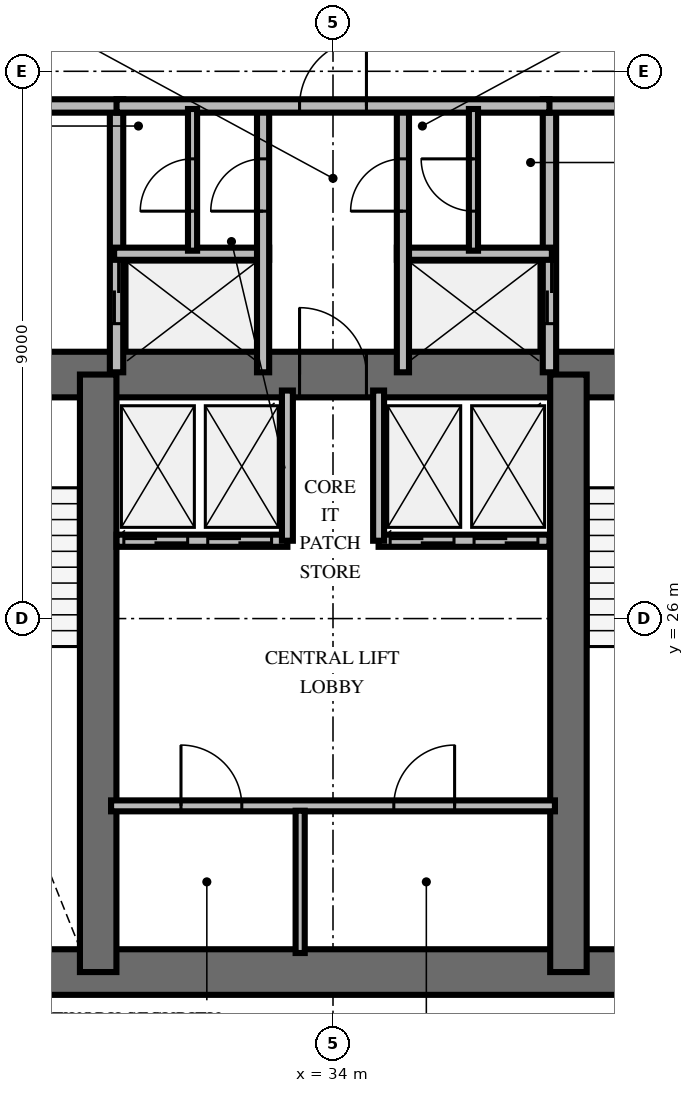
"""IFC4 building model, lengths in metres.
Left out: names, types, materials, properties, quantities, classifications, styles, units other than length and angle.
Written with IfcOpenShell. Run it as: python <this file> out.ifc"""

import sys

from ifc_helpers import new_model, si_unit, direction, frame, frame_2d, origin, place, context, subcontext, project, spatial, rectangle, extrude, element, fill, save


model = new_model("IFC4")
c1 = context("Model", 3, precision=1e-05, world=origin(), true_north=direction((0.0, 1.0)))
c2 = subcontext(c1, "Body", "Model", "MODEL_VIEW")
j1 = project(units=[si_unit("LENGTHUNIT", "METRE"), si_unit("PLANEANGLEUNIT", "RADIAN")], contexts=[c1])
p1 = place(None, origin())
s1 = spatial("IfcSite", under=j1, at=p1, CompositionType="ELEMENT")
p2 = place(p1, origin())
s2 = spatial("IfcBuilding", under=s1, at=p2, CompositionType="ELEMENT")
p3 = place(p2, frame((0.0, 0.0, 198.8)))
s3 = spatial("IfcBuildingStorey", under=s2, at=p3, CompositionType="ELEMENT", Elevation=198.8)
p4 = place(p3, frame((26.072, 20.187, 0.0), z_axis=(0.0, 0.0, 1.0), x_axis=(1.0, 0.0, 0.0)))
e1 = element("IfcWall", 1, at=p4, inside=s3, PredefinedType="SHEAR", context=c2, shape_type="SweptSolid", body=[
    extrude(rectangle(XDim=15.866, YDim=0.75, at=frame_2d((7.933, 0.0))), origin(), (0.0, 0.0, 1.0), 3.6),
])
p5 = place(p3, frame((26.072, 30.013, 0.0), z_axis=(0.0, 0.0, 1.0), x_axis=(1.0, 0.0, 0.0)))
e2 = element("IfcWall", 2, at=p5, inside=s3, PredefinedType="SHEAR", context=c2, shape_type="SweptSolid", body=[
    extrude(rectangle(XDim=15.866, YDim=0.75, at=frame_2d((7.933, 0.0))), origin(), (0.0, 0.0, 1.0), 3.6),
])
p6 = place(p5, frame((0.878, 0.0, 0.0)))
e3 = element("IfcOpeningElement", 3, at=p6, cuts=e2, PredefinedType="OPENING", context=c2, shape_type="SweptSolid", body=[
    extrude(rectangle(XDim=1.05, YDim=2.15, at=frame_2d((0.525, 1.075))), frame((0.0, 0.385, 0.0), z_axis=(0.0, -1.0, 0.0), x_axis=(1.0, 0.0, 0.0)), (0.0, 0.0, 1.0), 0.77),
])
p7 = place(p5, frame((13.928, 0.0, 0.0)))
e4 = element("IfcOpeningElement", 4, at=p7, cuts=e2, PredefinedType="OPENING", context=c2, shape_type="SweptSolid", body=[
    extrude(rectangle(XDim=1.05, YDim=2.15, at=frame_2d((0.525, 1.075))), frame((0.0, 0.385, 0.0), z_axis=(0.0, -1.0, 0.0), x_axis=(1.0, 0.0, 0.0)), (0.0, 0.0, 1.0), 0.77),
])
p8 = place(p5, frame((7.378, 0.0, 0.0)))
e5 = element("IfcOpeningElement", 5, at=p8, cuts=e2, PredefinedType="OPENING", context=c2, shape_type="SweptSolid", body=[
    extrude(rectangle(XDim=1.1, YDim=2.15, at=frame_2d((0.55, 1.075))), frame((0.0, 0.385, 0.0), z_axis=(0.0, -1.0, 0.0), x_axis=(1.0, 0.0, 0.0)), (0.0, 0.0, 1.0), 0.77),
])
for number, where, z_axis, x_axis in (
    (6, (30.138, 20.187, 0.0), (0.0, 0.0, 1.0), (0.0, 1.0, 0.0)),
    (7, (37.872, 20.187, 0.0), (0.0, 0.0, 1.0), (0.0, 1.0, 0.0)),
):
    element("IfcWall", number, at=place(p3, frame(where, z_axis=z_axis, x_axis=x_axis)), inside=s3, PredefinedType="SHEAR", context=c2, shape_type="SweptSolid", body=[
        extrude(rectangle(XDim=9.826, YDim=0.6, at=frame_2d((4.913, 0.0))), origin(), (0.0, 0.0, 1.0), 3.6),
    ])
p9 = place(p3, frame((30.44, 30.05, 0.0), z_axis=(0.0, 0.0, 1.0), x_axis=(0.0, 1.0, 0.0)))
e8 = element("IfcWall", 8, at=p9, inside=s3, PredefinedType="SOLIDWALL", context=c2, shape_type="SweptSolid", body=[
    extrude(rectangle(XDim=4.38, YDim=0.22, at=frame_2d((2.19, 0.0))), origin(), (0.0, 0.0, 1.0), 2.46),
])
p10 = place(p9, frame((0.8, 0.0, 0.0)))
e9 = element("IfcOpeningElement", 9, at=p10, cuts=e8, PredefinedType="OPENING", context=c2, shape_type="SweptSolid", body=[
    extrude(rectangle(XDim=1.05, YDim=2.1, at=frame_2d((0.525, 1.05))), frame((0.0, 0.12, 0.0), z_axis=(0.0, -1.0, 0.0), x_axis=(1.0, 0.0, 0.0)), (0.0, 0.0, 1.0), 0.24),
])
p11 = place(p3, frame((26.24, 34.43, 0.0), z_axis=(0.0, 0.0, 1.0), x_axis=(1.0, 0.0, 0.0)))
e10 = element("IfcWall", 10, at=p11, inside=s3, PredefinedType="SOLIDWALL", context=c2, shape_type="SweptSolid", body=[
    extrude(rectangle(XDim=4.31, YDim=0.22, at=frame_2d((2.155, 0.0))), origin(), (0.0, 0.0, 1.0), 2.46),
])
p12 = place(p11, frame((1.6, 0.0, 0.0)))
e11 = element("IfcOpeningElement", 11, at=p12, cuts=e10, PredefinedType="OPENING", context=c2, shape_type="SweptSolid", body=[
    extrude(rectangle(XDim=1.1, YDim=2.15, at=frame_2d((0.55, 1.075))), frame((0.0, 0.12, 0.0), z_axis=(0.0, -1.0, 0.0), x_axis=(1.0, 0.0, 0.0)), (0.0, 0.0, 1.0), 0.24),
])
p13 = place(p3, frame((30.4, 32.0, 0.0), z_axis=(0.0, 0.0, 1.0), x_axis=(1.0, 0.0, 0.0)))
e12 = element("IfcWall", 12, at=p13, inside=s3, PredefinedType="SOLIDWALL", context=c2, shape_type="SweptSolid", body=[
    extrude(rectangle(XDim=2.55, YDim=0.2, at=frame_2d((1.275, 0.0))), origin(), (0.0, 0.0, 1.0), 2.46),
])
p14 = place(p3, frame((32.85, 30.05, 0.0), z_axis=(0.0, 0.0, 1.0), x_axis=(0.0, 1.0, 0.0)))
e13 = element("IfcWall", 13, at=p14, inside=s3, PredefinedType="SOLIDWALL", context=c2, shape_type="SweptSolid", body=[
    extrude(rectangle(XDim=4.38, YDim=0.2, at=frame_2d((2.19, 0.0))), origin(), (0.0, 0.0, 1.0), 2.46),
])
p15 = place(p14, frame((2.65, 0.0, 0.0)))
e14 = element("IfcOpeningElement", 14, at=p15, cuts=e13, PredefinedType="OPENING", context=c2, shape_type="SweptSolid", body=[
    extrude(rectangle(XDim=0.86, YDim=2.05, at=frame_2d((0.43, 1.025))), frame((0.0, 0.11, 0.0), z_axis=(0.0, -1.0, 0.0), x_axis=(1.0, 0.0, 0.0)), (0.0, 0.0, 1.0), 0.22),
])
p16 = place(p3, frame((37.56, 30.05, 0.0), z_axis=(0.0, 0.0, 1.0), x_axis=(0.0, 1.0, 0.0)))
e15 = element("IfcWall", 15, at=p16, inside=s3, PredefinedType="SOLIDWALL", context=c2, shape_type="SweptSolid", body=[
    extrude(rectangle(XDim=4.38, YDim=0.22, at=frame_2d((2.19, 0.0))), origin(), (0.0, 0.0, 1.0), 2.46),
])
p17 = place(p16, frame((0.8, 0.0, 0.0)))
e16 = element("IfcOpeningElement", 16, at=p17, cuts=e15, PredefinedType="OPENING", context=c2, shape_type="SweptSolid", body=[
    extrude(rectangle(XDim=1.05, YDim=2.1, at=frame_2d((0.525, 1.05))), frame((0.0, 0.12, 0.0), z_axis=(0.0, -1.0, 0.0), x_axis=(1.0, 0.0, 0.0)), (0.0, 0.0, 1.0), 0.24),
])
p18 = place(p3, frame((37.45, 34.43, 0.0), z_axis=(0.0, 0.0, 1.0), x_axis=(1.0, 0.0, 0.0)))
e17 = element("IfcWall", 17, at=p18, inside=s3, PredefinedType="SOLIDWALL", context=c2, shape_type="SweptSolid", body=[
    extrude(rectangle(XDim=4.31, YDim=0.22, at=frame_2d((2.155, 0.0))), origin(), (0.0, 0.0, 1.0), 2.46),
])
p19 = place(p18, frame((1.6, 0.0, 0.0)))
e18 = element("IfcOpeningElement", 18, at=p19, cuts=e17, PredefinedType="OPENING", context=c2, shape_type="SweptSolid", body=[
    extrude(rectangle(XDim=1.1, YDim=2.15, at=frame_2d((0.55, 1.075))), frame((0.0, 0.12, 0.0), z_axis=(0.0, -1.0, 0.0), x_axis=(1.0, 0.0, 0.0)), (0.0, 0.0, 1.0), 0.24),
])
p20 = place(p3, frame((35.05, 32.0, 0.0), z_axis=(0.0, 0.0, 1.0), x_axis=(1.0, 0.0, 0.0)))
e19 = element("IfcWall", 19, at=p20, inside=s3, PredefinedType="SOLIDWALL", context=c2, shape_type="SweptSolid", body=[
    extrude(rectangle(XDim=2.55, YDim=0.2, at=frame_2d((1.275, 0.0))), origin(), (0.0, 0.0, 1.0), 2.46),
])
p21 = place(p3, frame((35.15, 30.05, 0.0), z_axis=(0.0, 0.0, 1.0), x_axis=(0.0, 1.0, 0.0)))
e20 = element("IfcWall", 20, at=p21, inside=s3, PredefinedType="SOLIDWALL", context=c2, shape_type="SweptSolid", body=[
    extrude(rectangle(XDim=4.38, YDim=0.2, at=frame_2d((2.19, 0.0))), origin(), (0.0, 0.0, 1.0), 2.46),
])
p22 = place(p21, frame((2.65, 0.0, 0.0)))
e21 = element("IfcOpeningElement", 21, at=p22, cuts=e20, PredefinedType="OPENING", context=c2, shape_type="SweptSolid", body=[
    extrude(rectangle(XDim=0.86, YDim=2.05, at=frame_2d((0.43, 1.025))), frame((0.0, 0.11, 0.0), z_axis=(0.0, -1.0, 0.0), x_axis=(1.0, 0.0, 0.0)), (0.0, 0.0, 1.0), 0.22),
])
p23 = place(p3, frame((30.44, 34.43, 0.0), z_axis=(0.0, 0.0, 1.0), x_axis=(1.0, 0.0, 0.0)))
e22 = element("IfcWall", 22, at=p23, inside=s3, PredefinedType="SOLIDWALL", context=c2, shape_type="SweptSolid", body=[
    extrude(rectangle(XDim=7.12, YDim=0.22, at=frame_2d((3.56, 0.0))), origin(), (0.0, 0.0, 1.0), 2.46),
])
p24 = place(p23, frame((3.01, 0.0, 0.0)))
e23 = element("IfcOpeningElement", 23, at=p24, cuts=e22, PredefinedType="OPENING", context=c2, shape_type="SweptSolid", body=[
    extrude(rectangle(XDim=1.1, YDim=2.15, at=frame_2d((0.55, 1.075))), frame((0.0, 0.12, 0.0), z_axis=(0.0, -1.0, 0.0), x_axis=(1.0, 0.0, 0.0)), (0.0, 0.0, 1.0), 0.24),
])
p25 = place(p3, frame((31.69, 32.05, 0.0), z_axis=(0.0, 0.0, 1.0), x_axis=(0.0, 1.0, 0.0)))
e24 = element("IfcWall", 24, at=p25, inside=s3, PredefinedType="PARTITIONING", context=c2, shape_type="SweptSolid", body=[
    extrude(rectangle(XDim=2.33, YDim=0.15, at=frame_2d((1.165, 0.0))), origin(), (0.0, 0.0, 1.0), 2.46),
])
p26 = place(p25, frame((0.65, 0.0, 0.0)))
e25 = element("IfcOpeningElement", 25, at=p26, cuts=e24, PredefinedType="OPENING", context=c2, shape_type="SweptSolid", body=[
    extrude(rectangle(XDim=0.86, YDim=2.05, at=frame_2d((0.43, 1.025))), frame((0.0, 0.085, 0.0), z_axis=(0.0, -1.0, 0.0), x_axis=(1.0, 0.0, 0.0)), (0.0, 0.0, 1.0), 0.17),
])
p27 = place(p3, frame((36.31, 32.05, 0.0), z_axis=(0.0, 0.0, 1.0), x_axis=(0.0, 1.0, 0.0)))
e26 = element("IfcWall", 26, at=p27, inside=s3, PredefinedType="PARTITIONING", context=c2, shape_type="SweptSolid", body=[
    extrude(rectangle(XDim=2.33, YDim=0.15, at=frame_2d((1.165, 0.0))), origin(), (0.0, 0.0, 1.0), 2.46),
])
p28 = place(p27, frame((0.65, 0.0, 0.0)))
e27 = element("IfcOpeningElement", 27, at=p28, cuts=e26, PredefinedType="OPENING", context=c2, shape_type="SweptSolid", body=[
    extrude(rectangle(XDim=0.86, YDim=2.05, at=frame_2d((0.43, 1.025))), frame((0.0, 0.085, 0.0), z_axis=(0.0, -1.0, 0.0), x_axis=(1.0, 0.0, 0.0)), (0.0, 0.0, 1.0), 0.17),
])
p29 = place(p3, frame((30.35, 22.92, 0.0), z_axis=(0.0, 0.0, 1.0), x_axis=(1.0, 0.0, 0.0)))
e28 = element("IfcWall", 28, at=p29, inside=s3, PredefinedType="PARTITIONING", context=c2, shape_type="SweptSolid", body=[
    extrude(rectangle(XDim=7.3, YDim=0.18, at=frame_2d((3.65, 0.0))), origin(), (0.0, 0.0, 1.0), 2.46),
])
p30 = place(p29, frame((1.15, 0.0, 0.0)))
e29 = element("IfcOpeningElement", 29, at=p30, cuts=e28, PredefinedType="OPENING", context=c2, shape_type="SweptSolid", body=[
    extrude(rectangle(XDim=1.0, YDim=2.15, at=frame_2d((0.5, 1.075))), frame((0.0, 0.1, 0.0), z_axis=(0.0, -1.0, 0.0), x_axis=(1.0, 0.0, 0.0)), (0.0, 0.0, 1.0), 0.2),
])
p31 = place(p29, frame((4.65, 0.0, 0.0)))
e30 = element("IfcOpeningElement", 30, at=p31, cuts=e28, PredefinedType="OPENING", context=c2, shape_type="SweptSolid", body=[
    extrude(rectangle(XDim=1.0, YDim=2.15, at=frame_2d((0.5, 1.075))), frame((0.0, 0.1, 0.0), z_axis=(0.0, -1.0, 0.0), x_axis=(1.0, 0.0, 0.0)), (0.0, 0.0, 1.0), 0.2),
])
p32 = place(p3, frame((33.46, 20.5, 0.0), z_axis=(0.0, 0.0, 1.0), x_axis=(0.0, 1.0, 0.0)))
e31 = element("IfcWall", 31, at=p32, inside=s3, PredefinedType="PARTITIONING", context=c2, shape_type="SweptSolid", body=[
    extrude(rectangle(XDim=2.34, YDim=0.15, at=frame_2d((1.17, 0.0))), origin(), (0.0, 0.0, 1.0), 2.46),
])
p33 = place(p3, frame((30.44, 27.28, 0.0), z_axis=(0.0, 0.0, 1.0), x_axis=(1.0, 0.0, 0.0)))
e32 = element("IfcWall", 32, at=p33, inside=s3, PredefinedType="SOLIDWALL", context=c2, shape_type="SweptSolid", body=[
    extrude(rectangle(XDim=2.81, YDim=0.2, at=frame_2d((1.405, 0.0))), origin(), (0.0, 0.0, 1.0), 2.46),
])
p34 = place(p33, frame((0.12, 0.0, 0.0)))
e33 = element("IfcOpeningElement", 33, at=p34, cuts=e32, PredefinedType="OPENING", context=c2, shape_type="SweptSolid", body=[
    extrude(rectangle(XDim=1.05, YDim=2.1, at=frame_2d((0.525, 1.05))), frame((0.0, 0.11, 0.0), z_axis=(0.0, -1.0, 0.0), x_axis=(1.0, 0.0, 0.0)), (0.0, 0.0, 1.0), 0.22),
])
p35 = place(p33, frame((1.5, 0.0, 0.0)))
e34 = element("IfcOpeningElement", 34, at=p35, cuts=e32, PredefinedType="OPENING", context=c2, shape_type="SweptSolid", body=[
    extrude(rectangle(XDim=1.05, YDim=2.1, at=frame_2d((0.525, 1.05))), frame((0.0, 0.11, 0.0), z_axis=(0.0, -1.0, 0.0), x_axis=(1.0, 0.0, 0.0)), (0.0, 0.0, 1.0), 0.22),
])
p36 = place(p3, frame((33.25, 27.28, 0.0), z_axis=(0.0, 0.0, 1.0), x_axis=(0.0, 1.0, 0.0)))
e35 = element("IfcWall", 35, at=p36, inside=s3, PredefinedType="SOLIDWALL", context=c2, shape_type="SweptSolid", body=[
    extrude(rectangle(XDim=2.47, YDim=0.18, at=frame_2d((1.235, 0.0))), origin(), (0.0, 0.0, 1.0), 2.46),
])
p37 = place(p3, frame((34.75, 27.28, 0.0), z_axis=(0.0, 0.0, 1.0), x_axis=(1.0, 0.0, 0.0)))
e36 = element("IfcWall", 36, at=p37, inside=s3, PredefinedType="SOLIDWALL", context=c2, shape_type="SweptSolid", body=[
    extrude(rectangle(XDim=2.81, YDim=0.2, at=frame_2d((1.405, 0.0))), origin(), (0.0, 0.0, 1.0), 2.46),
])
p38 = place(p37, frame((0.19, 0.0, 0.0)))
e37 = element("IfcOpeningElement", 37, at=p38, cuts=e36, PredefinedType="OPENING", context=c2, shape_type="SweptSolid", body=[
    extrude(rectangle(XDim=1.05, YDim=2.1, at=frame_2d((0.525, 1.05))), frame((0.0, 0.11, 0.0), z_axis=(0.0, -1.0, 0.0), x_axis=(1.0, 0.0, 0.0)), (0.0, 0.0, 1.0), 0.22),
])
p39 = place(p37, frame((1.57, 0.0, 0.0)))
e38 = element("IfcOpeningElement", 38, at=p39, cuts=e36, PredefinedType="OPENING", context=c2, shape_type="SweptSolid", body=[
    extrude(rectangle(XDim=1.05, YDim=2.1, at=frame_2d((0.525, 1.05))), frame((0.0, 0.11, 0.0), z_axis=(0.0, -1.0, 0.0), x_axis=(1.0, 0.0, 0.0)), (0.0, 0.0, 1.0), 0.22),
])
p40 = place(p3, frame((34.75, 27.28, 0.0), z_axis=(0.0, 0.0, 1.0), x_axis=(0.0, 1.0, 0.0)))
e39 = element("IfcWall", 39, at=p40, inside=s3, PredefinedType="SOLIDWALL", context=c2, shape_type="SweptSolid", body=[
    extrude(rectangle(XDim=2.47, YDim=0.18, at=frame_2d((1.235, 0.0))), origin(), (0.0, 0.0, 1.0), 2.46),
])
p41 = place(p3, frame((27.5, 35.28, 0.0), z_axis=(0.0, 0.0, 1.0), x_axis=(0.953691418528, 0.300786765376, 0.0)))
e40 = element("IfcWall", 40, at=p41, inside=s3, PredefinedType="PARTITIONING", context=c2, shape_type="SweptSolid", body=[
    extrude(rectangle(XDim=6.816, YDim=0.18, at=frame_2d((3.408, 0.0))), origin(), (0.0, 0.0, 1.0), 2.46),
])
p42 = place(p41, frame((2.858, 0.0, 0.0)))
e41 = element("IfcOpeningElement", 41, at=p42, cuts=e40, PredefinedType="OPENING", context=c2, shape_type="SweptSolid", body=[
    extrude(rectangle(XDim=1.1, YDim=2.15, at=frame_2d((0.55, 1.075))), frame((0.0, 0.1, 0.0), z_axis=(0.0, -1.0, 0.0), x_axis=(1.0, 0.0, 0.0)), (0.0, 0.0, 1.0), 0.2),
])
p43 = place(p3, frame((34.0, 37.33, 0.0), z_axis=(0.0, 0.0, 1.0), x_axis=(0.953691418528, -0.300786765376, 0.0)))
e42 = element("IfcWall", 42, at=p43, inside=s3, PredefinedType="PARTITIONING", context=c2, shape_type="SweptSolid", body=[
    extrude(rectangle(XDim=6.816, YDim=0.18, at=frame_2d((3.408, 0.0))), origin(), (0.0, 0.0, 1.0), 2.46),
])
p44 = place(p43, frame((2.858, 0.0, 0.0)))
e43 = element("IfcOpeningElement", 43, at=p44, cuts=e42, PredefinedType="OPENING", context=c2, shape_type="SweptSolid", body=[
    extrude(rectangle(XDim=1.1, YDim=2.15, at=frame_2d((0.55, 1.075))), frame((0.0, 0.1, 0.0), z_axis=(0.0, -1.0, 0.0), x_axis=(1.0, 0.0, 0.0)), (0.0, 0.0, 1.0), 0.2),
])
p45 = place(p8, origin())
e44 = element("IfcDoor", 44, at=p45, inside=s3, OperationType="SINGLE_SWING_LEFT", PredefinedType="DOOR", context=c2, shape_type="SweptSolid", body=[
    extrude(rectangle(XDim=1.1, YDim=2.15, at=frame_2d((0.55, 1.075))), frame((0.0, 0.025, 0.0), z_axis=(0.0, -1.0, 0.0), x_axis=(1.0, 0.0, 0.0)), (0.0, 0.0, 1.0), 0.05),
])
fill(e5, e44)
p46 = place(p10, origin())
e45 = element("IfcDoor", 45, at=p46, inside=s3, OperationType="DOUBLE_DOOR_SLIDING", PredefinedType="USERDEFINED", context=c2, shape_type="SweptSolid", body=[
    extrude(rectangle(XDim=1.05, YDim=2.1, at=frame_2d((0.525, 1.05))), frame((0.0, 0.025, 0.0), z_axis=(0.0, -1.0, 0.0), x_axis=(1.0, 0.0, 0.0)), (0.0, 0.0, 1.0), 0.05),
])
fill(e9, e45)
p47 = place(p15, origin())
e46 = element("IfcDoor", 46, at=p47, inside=s3, OperationType="SINGLE_SWING_LEFT", PredefinedType="TRAPDOOR", context=c2, shape_type="SweptSolid", body=[
    extrude(rectangle(XDim=0.86, YDim=2.05, at=frame_2d((0.43, 1.025))), frame((0.0, 0.025, 0.0), z_axis=(0.0, -1.0, 0.0), x_axis=(1.0, 0.0, 0.0)), (0.0, 0.0, 1.0), 0.05),
])
fill(e14, e46)
p48 = place(p17, origin())
e47 = element("IfcDoor", 47, at=p48, inside=s3, OperationType="DOUBLE_DOOR_SLIDING", PredefinedType="USERDEFINED", context=c2, shape_type="SweptSolid", body=[
    extrude(rectangle(XDim=1.05, YDim=2.1, at=frame_2d((0.525, 1.05))), frame((0.0, 0.025, 0.0), z_axis=(0.0, -1.0, 0.0), x_axis=(1.0, 0.0, 0.0)), (0.0, 0.0, 1.0), 0.05),
])
fill(e16, e47)
p49 = place(p22, origin())
e48 = element("IfcDoor", 48, at=p49, inside=s3, OperationType="SINGLE_SWING_LEFT", PredefinedType="TRAPDOOR", context=c2, shape_type="SweptSolid", body=[
    extrude(rectangle(XDim=0.86, YDim=2.05, at=frame_2d((0.43, 1.025))), frame((0.0, 0.025, 0.0), z_axis=(0.0, -1.0, 0.0), x_axis=(1.0, 0.0, 0.0)), (0.0, 0.0, 1.0), 0.05),
])
fill(e21, e48)
p50 = place(p24, origin())
e49 = element("IfcDoor", 49, at=p50, inside=s3, OperationType="SINGLE_SWING_RIGHT", PredefinedType="DOOR", context=c2, shape_type="SweptSolid", body=[
    extrude(rectangle(XDim=1.1, YDim=2.15, at=frame_2d((0.55, 1.075))), frame((0.0, 0.025, 0.0), z_axis=(0.0, -1.0, 0.0), x_axis=(1.0, 0.0, 0.0)), (0.0, 0.0, 1.0), 0.05),
])
fill(e23, e49)
p51 = place(p26, origin())
e50 = element("IfcDoor", 50, at=p51, inside=s3, OperationType="SINGLE_SWING_LEFT", PredefinedType="TRAPDOOR", context=c2, shape_type="SweptSolid", body=[
    extrude(rectangle(XDim=0.86, YDim=2.05, at=frame_2d((0.43, 1.025))), frame((0.0, 0.025, 0.0), z_axis=(0.0, -1.0, 0.0), x_axis=(1.0, 0.0, 0.0)), (0.0, 0.0, 1.0), 0.05),
])
fill(e25, e50)
p52 = place(p28, origin())
e51 = element("IfcDoor", 51, at=p52, inside=s3, OperationType="SINGLE_SWING_RIGHT", PredefinedType="TRAPDOOR", context=c2, shape_type="SweptSolid", body=[
    extrude(rectangle(XDim=0.86, YDim=2.05, at=frame_2d((0.43, 1.025))), frame((0.0, 0.025, 0.0), z_axis=(0.0, -1.0, 0.0), x_axis=(1.0, 0.0, 0.0)), (0.0, 0.0, 1.0), 0.05),
])
fill(e27, e51)
p53 = place(p30, origin())
e52 = element("IfcDoor", 52, at=p53, inside=s3, OperationType="SINGLE_SWING_LEFT", PredefinedType="DOOR", context=c2, shape_type="SweptSolid", body=[
    extrude(rectangle(XDim=1.0, YDim=2.15, at=frame_2d((0.5, 1.075))), frame((0.0, 0.025, 0.0), z_axis=(0.0, -1.0, 0.0), x_axis=(1.0, 0.0, 0.0)), (0.0, 0.0, 1.0), 0.05),
])
fill(e29, e52)
p54 = place(p31, origin())
e53 = element("IfcDoor", 53, at=p54, inside=s3, OperationType="SINGLE_SWING_RIGHT", PredefinedType="DOOR", context=c2, shape_type="SweptSolid", body=[
    extrude(rectangle(XDim=1.0, YDim=2.15, at=frame_2d((0.5, 1.075))), frame((0.0, 0.025, 0.0), z_axis=(0.0, -1.0, 0.0), x_axis=(1.0, 0.0, 0.0)), (0.0, 0.0, 1.0), 0.05),
])
fill(e30, e53)
p55 = place(p34, origin())
e54 = element("IfcDoor", 54, at=p55, inside=s3, OperationType="DOUBLE_DOOR_SLIDING", PredefinedType="USERDEFINED", context=c2, shape_type="SweptSolid", body=[
    extrude(rectangle(XDim=1.05, YDim=2.1, at=frame_2d((0.525, 1.05))), frame((0.0, 0.025, 0.0), z_axis=(0.0, -1.0, 0.0), x_axis=(1.0, 0.0, 0.0)), (0.0, 0.0, 1.0), 0.05),
])
fill(e33, e54)
p56 = place(p35, origin())
e55 = element("IfcDoor", 55, at=p56, inside=s3, OperationType="DOUBLE_DOOR_SLIDING", PredefinedType="USERDEFINED", context=c2, shape_type="SweptSolid", body=[
    extrude(rectangle(XDim=1.05, YDim=2.1, at=frame_2d((0.525, 1.05))), frame((0.0, 0.025, 0.0), z_axis=(0.0, -1.0, 0.0), x_axis=(1.0, 0.0, 0.0)), (0.0, 0.0, 1.0), 0.05),
])
fill(e34, e55)
p57 = place(p38, origin())
e56 = element("IfcDoor", 56, at=p57, inside=s3, OperationType="DOUBLE_DOOR_SLIDING", PredefinedType="USERDEFINED", context=c2, shape_type="SweptSolid", body=[
    extrude(rectangle(XDim=1.05, YDim=2.1, at=frame_2d((0.525, 1.05))), frame((0.0, 0.025, 0.0), z_axis=(0.0, -1.0, 0.0), x_axis=(1.0, 0.0, 0.0)), (0.0, 0.0, 1.0), 0.05),
])
fill(e37, e56)
p58 = place(p39, origin())
e57 = element("IfcDoor", 57, at=p58, inside=s3, OperationType="DOUBLE_DOOR_SLIDING", PredefinedType="USERDEFINED", context=c2, shape_type="SweptSolid", body=[
    extrude(rectangle(XDim=1.05, YDim=2.1, at=frame_2d((0.525, 1.05))), frame((0.0, 0.025, 0.0), z_axis=(0.0, -1.0, 0.0), x_axis=(1.0, 0.0, 0.0)), (0.0, 0.0, 1.0), 0.05),
])
fill(e38, e57)
save(model, sys.argv[1])
